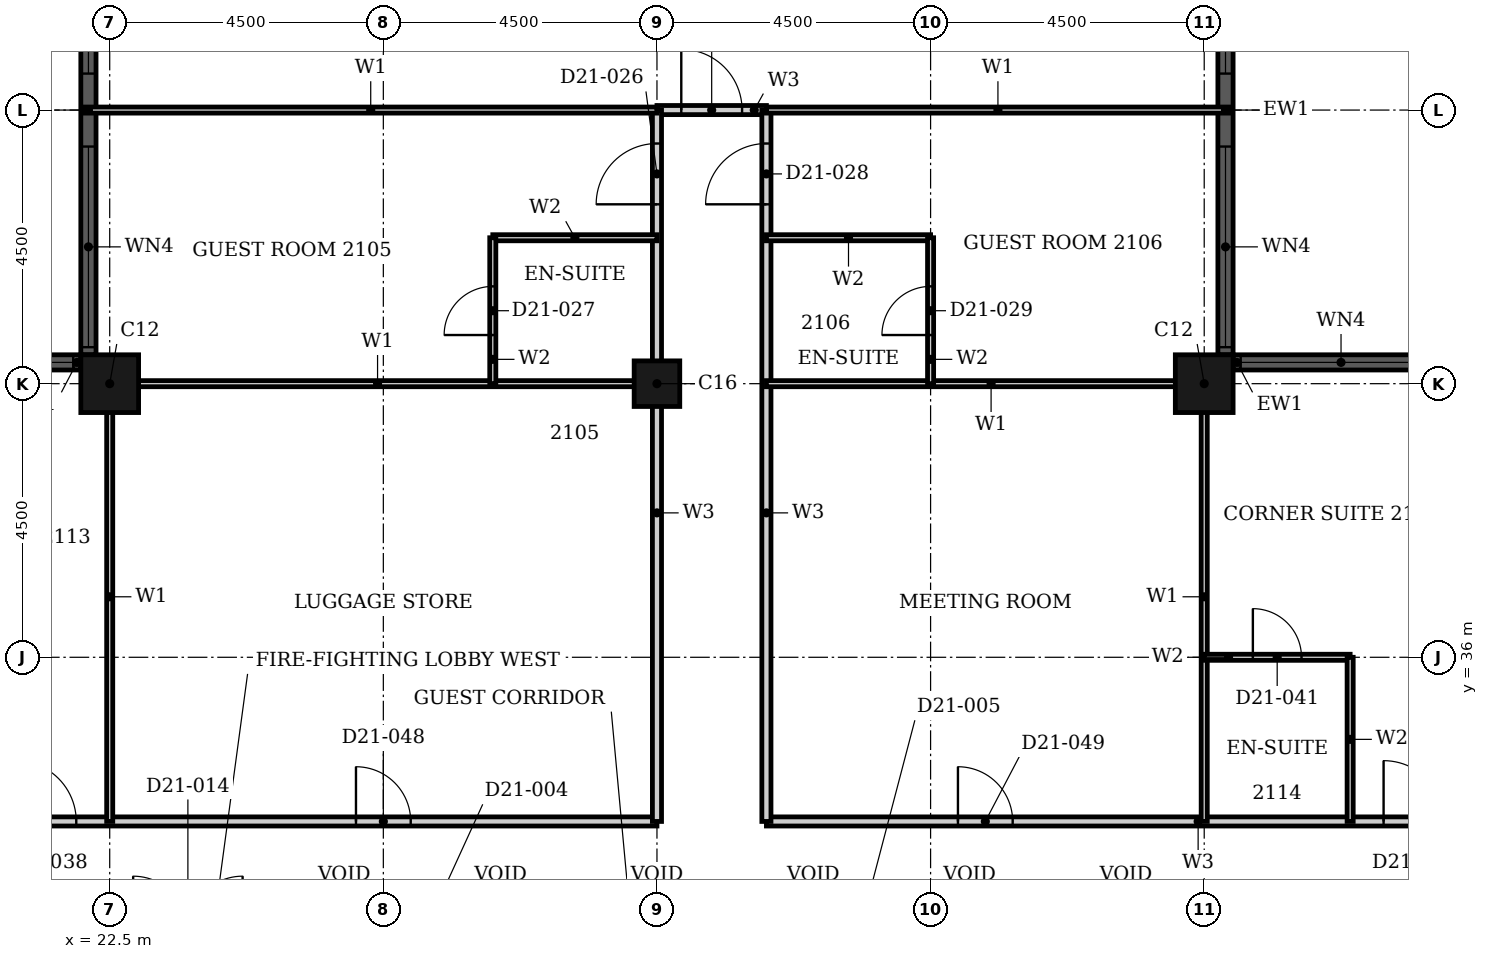
"""IFC4 building model, lengths in metres.
Left out: names, types, materials, properties, quantities, classifications, styles, units other than length and angle.
Written with IfcOpenShell. Run it as: python <this file> out.ifc"""

import sys

from ifc_helpers import new_model, si_unit, direction, frame, frame_2d, origin, origin_2d, place, context, subcontext, project, spatial, rectangle, hollow_rectangle, extrude, element, fill, save


model = new_model("IFC4")
c1 = context("Model", 3, precision=1e-05, world=origin(), true_north=direction((0.0, 1.0)))
c2 = subcontext(c1, "Body", "Model", "MODEL_VIEW")
j1 = project(units=[si_unit("LENGTHUNIT", "METRE"), si_unit("PLANEANGLEUNIT", "RADIAN")], contexts=[c1])
p1 = place(None, origin())
s1 = spatial("IfcSite", under=j1, at=p1, CompositionType="ELEMENT")
p2 = place(p1, origin())
s2 = spatial("IfcBuilding", under=s1, at=p2, CompositionType="ELEMENT")
p3 = place(p2, frame((0.0, 0.0, 88.8)))
s3 = spatial("IfcBuildingStorey", under=s2, at=p3, CompositionType="ELEMENT", Elevation=88.8)
for number, where, z_axis, x_axis in (
    (1, (40.5, 40.5, 0.0), (0.0, 0.0, 1.0), (1.0, 0.0, 0.0)),
    (2, (22.5, 40.5, 0.0), (0.0, 0.0, 1.0), (1.0, 0.0, 0.0)),
):
    element("IfcColumn", number, at=place(p3, frame(where, z_axis=z_axis, x_axis=x_axis)), inside=s3, PredefinedType="COLUMN", context=c2, shape_type="SweptSolid", body=[
        extrude(hollow_rectangle(XDim=0.95, YDim=0.95, WallThickness=0.03, at=origin_2d()), origin(), (0.0, 0.0, 1.0), 3.6),
    ])
p4 = place(p3, frame((31.5, 40.5, 0.0), z_axis=(0.0, 0.0, 1.0), x_axis=(1.0, 0.0, 0.0)))
e3 = element("IfcColumn", 3, at=p4, inside=s3, PredefinedType="COLUMN", context=c2, shape_type="SweptSolid", body=[
    extrude(hollow_rectangle(XDim=0.75, YDim=0.75, WallThickness=0.024, at=origin_2d()), origin(), (0.0, 0.0, 1.0), 3.6),
])
p5 = place(p3, frame((44.525, 40.85, 0.0), z_axis=(0.0, 0.0, 1.0), x_axis=(-1.0, 0.0, 0.0)))
e4 = element("IfcWall", 4, at=p5, inside=s3, PredefinedType="SOLIDWALL", context=c2, shape_type="SweptSolid", body=[
    extrude(rectangle(XDim=3.55, YDim=0.25, at=frame_2d((1.775, 0.0))), origin(), (0.0, 0.0, 1.0), 3.6),
])
p6 = place(p5, frame((0.125, 0.0, 0.9)))
e5 = element("IfcOpeningElement", 5, at=p6, cuts=e4, PredefinedType="OPENING", context=c2, shape_type="SweptSolid", body=[
    extrude(rectangle(XDim=3.3, YDim=2.08, at=frame_2d((1.65, 1.04))), frame((0.0, 0.135, 0.0), z_axis=(0.0, -1.0, 0.0), x_axis=(1.0, 0.0, 0.0)), (0.0, 0.0, 1.0), 0.27),
])
p7 = place(p3, frame((40.85, 40.975, 0.0), z_axis=(0.0, 0.0, 1.0), x_axis=(0.0, 1.0, 0.0)))
e6 = element("IfcWall", 6, at=p7, inside=s3, PredefinedType="SOLIDWALL", context=c2, shape_type="SweptSolid", body=[
    extrude(rectangle(XDim=8.05, YDim=0.25, at=frame_2d((4.025, 0.0))), origin(), (0.0, 0.0, 1.0), 3.6),
])
p8 = place(p7, frame((0.125, 0.0, 0.9)))
e7 = element("IfcOpeningElement", 7, at=p8, cuts=e6, PredefinedType="OPENING", context=c2, shape_type="SweptSolid", body=[
    extrude(rectangle(XDim=3.3, YDim=2.08, at=frame_2d((1.65, 1.04))), frame((0.0, 0.135, 0.0), z_axis=(0.0, -1.0, 0.0), x_axis=(1.0, 0.0, 0.0)), (0.0, 0.0, 1.0), 0.27),
])
p9 = place(p7, frame((4.625, 0.0, 0.9)))
e8 = element("IfcOpeningElement", 8, at=p9, cuts=e6, PredefinedType="OPENING", context=c2, shape_type="SweptSolid", body=[
    extrude(rectangle(XDim=3.3, YDim=2.08, at=frame_2d((1.65, 1.04))), frame((0.0, 0.135, 0.0), z_axis=(0.0, -1.0, 0.0), x_axis=(1.0, 0.0, 0.0)), (0.0, 0.0, 1.0), 0.27),
])
p10 = place(p3, frame((22.15, 49.025, 0.0), z_axis=(0.0, 0.0, 1.0), x_axis=(0.0, -1.0, 0.0)))
e9 = element("IfcWall", 9, at=p10, inside=s3, PredefinedType="SOLIDWALL", context=c2, shape_type="SweptSolid", body=[
    extrude(rectangle(XDim=8.05, YDim=0.25, at=frame_2d((4.025, 0.0))), origin(), (0.0, 0.0, 1.0), 3.6),
])
p11 = place(p10, frame((0.125, 0.0, 0.9)))
e10 = element("IfcOpeningElement", 10, at=p11, cuts=e9, PredefinedType="OPENING", context=c2, shape_type="SweptSolid", body=[
    extrude(rectangle(XDim=3.3, YDim=2.08, at=frame_2d((1.65, 1.04))), frame((0.0, 0.135, 0.0), z_axis=(0.0, -1.0, 0.0), x_axis=(1.0, 0.0, 0.0)), (0.0, 0.0, 1.0), 0.27),
])
p12 = place(p10, frame((4.625, 0.0, 0.9)))
e11 = element("IfcOpeningElement", 11, at=p12, cuts=e9, PredefinedType="OPENING", context=c2, shape_type="SweptSolid", body=[
    extrude(rectangle(XDim=3.3, YDim=2.08, at=frame_2d((1.65, 1.04))), frame((0.0, 0.135, 0.0), z_axis=(0.0, -1.0, 0.0), x_axis=(1.0, 0.0, 0.0)), (0.0, 0.0, 1.0), 0.27),
])
p13 = place(p3, frame((22.025, 40.85, 0.0), z_axis=(0.0, 0.0, 1.0), x_axis=(-1.0, 0.0, 0.0)))
e12 = element("IfcWall", 12, at=p13, inside=s3, PredefinedType="SOLIDWALL", context=c2, shape_type="SweptSolid", body=[
    extrude(rectangle(XDim=3.55, YDim=0.25, at=frame_2d((1.775, 0.0))), origin(), (0.0, 0.0, 1.0), 3.6),
])
p14 = place(p13, frame((0.125, 0.0, 0.9)))
e13 = element("IfcOpeningElement", 13, at=p14, cuts=e12, PredefinedType="OPENING", context=c2, shape_type="SweptSolid", body=[
    extrude(rectangle(XDim=3.3, YDim=2.08, at=frame_2d((1.65, 1.04))), frame((0.0, 0.135, 0.0), z_axis=(0.0, -1.0, 0.0), x_axis=(1.0, 0.0, 0.0)), (0.0, 0.0, 1.0), 0.27),
])
p15 = place(p3, frame((16.2, 33.3, 0.0), z_axis=(0.0, 0.0, 1.0), x_axis=(1.0, 0.0, 0.0)))
e14 = element("IfcWall", 14, at=p15, inside=s3, PredefinedType="PARTITIONING", context=c2, shape_type="SweptSolid", body=[
    extrude(rectangle(XDim=15.3, YDim=0.15, at=frame_2d((7.65, 0.0))), origin(), (0.0, 0.0, 1.0), 3.3),
])
p16 = place(p15, frame((4.75, 0.0, 0.0)))
e15 = element("IfcOpeningElement", 15, at=p16, cuts=e14, PredefinedType="OPENING", context=c2, shape_type="SweptSolid", body=[
    extrude(rectangle(XDim=1.0, YDim=2.1, at=frame_2d((0.5, 1.05))), frame((0.0, 0.085, 0.0), z_axis=(0.0, -1.0, 0.0), x_axis=(1.0, 0.0, 0.0)), (0.0, 0.0, 1.0), 0.17),
])
p17 = place(p15, frame((10.35, 0.0, 0.0)))
e16 = element("IfcOpeningElement", 16, at=p17, cuts=e14, PredefinedType="OPENING", context=c2, shape_type="SweptSolid", body=[
    extrude(rectangle(XDim=0.9, YDim=2.1, at=frame_2d((0.45, 1.05))), frame((0.0, 0.085, 0.0), z_axis=(0.0, -1.0, 0.0), x_axis=(1.0, 0.0, 0.0)), (0.0, 0.0, 1.0), 0.17),
])
p18 = place(p3, frame((33.3, 33.3, 0.0), z_axis=(0.0, 0.0, 1.0), x_axis=(1.0, 0.0, 0.0)))
e17 = element("IfcWall", 17, at=p18, inside=s3, PredefinedType="PARTITIONING", context=c2, shape_type="SweptSolid", body=[
    extrude(rectangle(XDim=13.5, YDim=0.15, at=frame_2d((6.75, 0.0))), origin(), (0.0, 0.0, 1.0), 3.3),
])
p19 = place(p18, frame((10.15, 0.0, 0.0)))
e18 = element("IfcOpeningElement", 18, at=p19, cuts=e17, PredefinedType="OPENING", context=c2, shape_type="SweptSolid", body=[
    extrude(rectangle(XDim=1.0, YDim=2.1, at=frame_2d((0.5, 1.05))), frame((0.0, 0.085, 0.0), z_axis=(0.0, -1.0, 0.0), x_axis=(1.0, 0.0, 0.0)), (0.0, 0.0, 1.0), 0.17),
])
p20 = place(p18, frame((3.15, 0.0, 0.0)))
e19 = element("IfcOpeningElement", 19, at=p20, cuts=e17, PredefinedType="OPENING", context=c2, shape_type="SweptSolid", body=[
    extrude(rectangle(XDim=0.9, YDim=2.1, at=frame_2d((0.45, 1.05))), frame((0.0, 0.085, 0.0), z_axis=(0.0, -1.0, 0.0), x_axis=(1.0, 0.0, 0.0)), (0.0, 0.0, 1.0), 0.17),
])
p21 = place(p3, frame((31.5, 45.0, 0.0), z_axis=(0.0, 0.0, 1.0), x_axis=(1.0, 0.0, 0.0)))
e20 = element("IfcWall", 20, at=p21, inside=s3, PredefinedType="PARTITIONING", context=c2, shape_type="SweptSolid", body=[
    extrude(rectangle(XDim=1.8, YDim=0.15, at=frame_2d((0.9, 0.0))), origin(), (0.0, 0.0, 1.0), 3.3),
])
p22 = place(p21, frame((0.4, 0.0, 0.0)))
e21 = element("IfcOpeningElement", 21, at=p22, cuts=e20, PredefinedType="OPENING", context=c2, shape_type="SweptSolid", body=[
    extrude(rectangle(XDim=1.0, YDim=2.1, at=frame_2d((0.5, 1.05))), frame((0.0, 0.085, 0.0), z_axis=(0.0, -1.0, 0.0), x_axis=(1.0, 0.0, 0.0)), (0.0, 0.0, 1.0), 0.17),
])
p23 = place(p3, frame((31.5, 33.3, 0.0), z_axis=(0.0, 0.0, 1.0), x_axis=(0.0, 1.0, 0.0)))
e22 = element("IfcWall", 22, at=p23, inside=s3, PredefinedType="PARTITIONING", context=c2, shape_type="SweptSolid", body=[
    extrude(rectangle(XDim=11.7, YDim=0.15, at=frame_2d((5.85, 0.0))), origin(), (0.0, 0.0, 1.0), 2.58),
])
p24 = place(p23, frame((10.15, 0.0, 0.0)))
e23 = element("IfcOpeningElement", 23, at=p24, cuts=e22, PredefinedType="OPENING", context=c2, shape_type="SweptSolid", body=[
    extrude(rectangle(XDim=1.0, YDim=2.1, at=frame_2d((0.5, 1.05))), frame((0.0, 0.085, 0.0), z_axis=(0.0, -1.0, 0.0), x_axis=(1.0, 0.0, 0.0)), (0.0, 0.0, 1.0), 0.17),
])
p25 = place(p3, frame((33.3, 33.3, 0.0), z_axis=(0.0, 0.0, 1.0), x_axis=(0.0, 1.0, 0.0)))
e24 = element("IfcWall", 24, at=p25, inside=s3, PredefinedType="PARTITIONING", context=c2, shape_type="SweptSolid", body=[
    extrude(rectangle(XDim=11.7, YDim=0.15, at=frame_2d((5.85, 0.0))), origin(), (0.0, 0.0, 1.0), 3.3),
])
p26 = place(p25, frame((10.15, 0.0, 0.0)))
e25 = element("IfcOpeningElement", 25, at=p26, cuts=e24, PredefinedType="OPENING", context=c2, shape_type="SweptSolid", body=[
    extrude(rectangle(XDim=1.0, YDim=2.1, at=frame_2d((0.5, 1.05))), frame((0.0, 0.085, 0.0), z_axis=(0.0, -1.0, 0.0), x_axis=(1.0, 0.0, 0.0)), (0.0, 0.0, 1.0), 0.17),
])
p27 = place(p3, frame((33.3, 40.5, 0.0), z_axis=(0.0, 0.0, 1.0), x_axis=(1.0, 0.0, 0.0)))
e26 = element("IfcWall", 26, at=p27, inside=s3, PredefinedType="PARTITIONING", context=c2, shape_type="SweptSolid", body=[
    extrude(rectangle(XDim=7.39, YDim=0.1, at=frame_2d((3.695, 0.0))), origin(), (0.0, 0.0, 1.0), 2.38),
])
p28 = place(p3, frame((22.31, 40.5, 0.0), z_axis=(0.0, 0.0, 1.0), x_axis=(1.0, 0.0, 0.0)))
e27 = element("IfcWall", 27, at=p28, inside=s3, PredefinedType="PARTITIONING", context=c2, shape_type="SweptSolid", body=[
    extrude(rectangle(XDim=9.19, YDim=0.1, at=frame_2d((4.595, 0.0))), origin(), (0.0, 0.0, 1.0), 2.38),
])
p29 = place(p3, frame((33.3, 45.0, 0.0), z_axis=(0.0, 0.0, 1.0), x_axis=(1.0, 0.0, 0.0)))
e28 = element("IfcWall", 28, at=p29, inside=s3, PredefinedType="PARTITIONING", context=c2, shape_type="SweptSolid", body=[
    extrude(rectangle(XDim=7.615, YDim=0.1, at=frame_2d((3.808, 0.0))), origin(), (0.0, 0.0, 1.0), 3.3),
])
p30 = place(p3, frame((22.085, 45.0, 0.0), z_axis=(0.0, 0.0, 1.0), x_axis=(1.0, 0.0, 0.0)))
e29 = element("IfcWall", 29, at=p30, inside=s3, PredefinedType="PARTITIONING", context=c2, shape_type="SweptSolid", body=[
    extrude(rectangle(XDim=9.415, YDim=0.1, at=frame_2d((4.708, 0.0))), origin(), (0.0, 0.0, 1.0), 3.3),
])
for number, where, z_axis, x_axis in (
    (30, (22.5, 33.3, 0.0), (0.0, 0.0, 1.0), (0.0, 1.0, 0.0)),
    (31, (40.5, 33.3, 0.0), (0.0, 0.0, 1.0), (0.0, 1.0, 0.0)),
):
    element("IfcWall", number, at=place(p3, frame(where, z_axis=z_axis, x_axis=x_axis)), inside=s3, PredefinedType="PARTITIONING", context=c2, shape_type="SweptSolid", body=[
        extrude(rectangle(XDim=7.39, YDim=0.1, at=frame_2d((3.695, 0.0))), origin(), (0.0, 0.0, 1.0), 3.3),
    ])
p31 = place(p3, frame((40.5, 36.0, 0.0), z_axis=(0.0, 0.0, 1.0), x_axis=(1.0, 0.0, 0.0)))
e32 = element("IfcWall", 32, at=p31, inside=s3, PredefinedType="PARTITIONING", context=c2, shape_type="SweptSolid", body=[
    extrude(rectangle(XDim=2.4, YDim=0.1, at=frame_2d((1.2, 0.0))), origin(), (0.0, 0.0, 1.0), 3.3),
])
p32 = place(p31, frame((0.8, 0.0, 0.0)))
e33 = element("IfcOpeningElement", 33, at=p32, cuts=e32, PredefinedType="OPENING", context=c2, shape_type="SweptSolid", body=[
    extrude(rectangle(XDim=0.8, YDim=2.1, at=frame_2d((0.4, 1.05))), frame((0.0, 0.06, 0.0), z_axis=(0.0, -1.0, 0.0), x_axis=(1.0, 0.0, 0.0)), (0.0, 0.0, 1.0), 0.12),
])
for number, where, z_axis, x_axis in (
    (34, (33.3, 42.9, 0.0), (0.0, 0.0, 1.0), (1.0, 0.0, 0.0)),
    (35, (28.8, 42.9, 0.0), (0.0, 0.0, 1.0), (1.0, 0.0, 0.0)),
):
    element("IfcWall", number, at=place(p3, frame(where, z_axis=z_axis, x_axis=x_axis)), inside=s3, PredefinedType="PARTITIONING", context=c2, shape_type="SweptSolid", body=[
        extrude(rectangle(XDim=2.7, YDim=0.1, at=frame_2d((1.35, 0.0))), origin(), (0.0, 0.0, 1.0), 3.3),
    ])
p33 = place(p3, frame((28.8, 40.5, 0.0), z_axis=(0.0, 0.0, 1.0), x_axis=(0.0, 1.0, 0.0)))
e36 = element("IfcWall", 36, at=p33, inside=s3, PredefinedType="PARTITIONING", context=c2, shape_type="SweptSolid", body=[
    extrude(rectangle(XDim=2.4, YDim=0.1, at=frame_2d((1.2, 0.0))), origin(), (0.0, 0.0, 1.0), 3.3),
])
p34 = place(p33, frame((0.8, 0.0, 0.0)))
e37 = element("IfcOpeningElement", 37, at=p34, cuts=e36, PredefinedType="OPENING", context=c2, shape_type="SweptSolid", body=[
    extrude(rectangle(XDim=0.8, YDim=2.1, at=frame_2d((0.4, 1.05))), frame((0.0, 0.06, 0.0), z_axis=(0.0, -1.0, 0.0), x_axis=(1.0, 0.0, 0.0)), (0.0, 0.0, 1.0), 0.12),
])
p35 = place(p3, frame((36.0, 40.5, 0.0), z_axis=(0.0, 0.0, 1.0), x_axis=(0.0, 1.0, 0.0)))
e38 = element("IfcWall", 38, at=p35, inside=s3, PredefinedType="PARTITIONING", context=c2, shape_type="SweptSolid", body=[
    extrude(rectangle(XDim=2.4, YDim=0.1, at=frame_2d((1.2, 0.0))), origin(), (0.0, 0.0, 1.0), 2.58),
])
p36 = place(p35, frame((0.8, 0.0, 0.0)))
e39 = element("IfcOpeningElement", 39, at=p36, cuts=e38, PredefinedType="OPENING", context=c2, shape_type="SweptSolid", body=[
    extrude(rectangle(XDim=0.8, YDim=2.1, at=frame_2d((0.4, 1.05))), frame((0.0, 0.06, 0.0), z_axis=(0.0, -1.0, 0.0), x_axis=(1.0, 0.0, 0.0)), (0.0, 0.0, 1.0), 0.12),
])
p37 = place(p3, frame((42.9, 33.3, 0.0), z_axis=(0.0, 0.0, 1.0), x_axis=(0.0, 1.0, 0.0)))
e40 = element("IfcWall", 40, at=p37, inside=s3, PredefinedType="PARTITIONING", context=c2, shape_type="SweptSolid", body=[
    extrude(rectangle(XDim=2.7, YDim=0.1, at=frame_2d((1.35, 0.0))), origin(), (0.0, 0.0, 1.0), 3.3),
])
p38 = place(p6, origin())
e41 = element("IfcWindow", 41, at=p38, inside=s3, PartitioningType="SINGLE_PANEL", PredefinedType="WINDOW", context=c2, shape_type="SweptSolid", body=[
    extrude(rectangle(XDim=3.3, YDim=2.08, at=frame_2d((1.65, 1.04))), frame((0.0, 0.03, 0.0), z_axis=(0.0, -1.0, 0.0), x_axis=(1.0, 0.0, 0.0)), (0.0, 0.0, 1.0), 0.06),
])
fill(e5, e41)
p39 = place(p8, origin())
e42 = element("IfcWindow", 42, at=p39, inside=s3, PartitioningType="SINGLE_PANEL", PredefinedType="WINDOW", context=c2, shape_type="SweptSolid", body=[
    extrude(rectangle(XDim=3.3, YDim=2.08, at=frame_2d((1.65, 1.04))), frame((0.0, 0.03, 0.0), z_axis=(0.0, -1.0, 0.0), x_axis=(1.0, 0.0, 0.0)), (0.0, 0.0, 1.0), 0.06),
])
fill(e7, e42)
p40 = place(p9, origin())
e43 = element("IfcWindow", 43, at=p40, inside=s3, PartitioningType="SINGLE_PANEL", PredefinedType="WINDOW", context=c2, shape_type="SweptSolid", body=[
    extrude(rectangle(XDim=3.3, YDim=2.08, at=frame_2d((1.65, 1.04))), frame((0.0, 0.03, 0.0), z_axis=(0.0, -1.0, 0.0), x_axis=(1.0, 0.0, 0.0)), (0.0, 0.0, 1.0), 0.06),
])
fill(e8, e43)
p41 = place(p11, origin())
e44 = element("IfcWindow", 44, at=p41, inside=s3, PartitioningType="SINGLE_PANEL", PredefinedType="WINDOW", context=c2, shape_type="SweptSolid", body=[
    extrude(rectangle(XDim=3.3, YDim=2.08, at=frame_2d((1.65, 1.04))), frame((0.0, 0.03, 0.0), z_axis=(0.0, -1.0, 0.0), x_axis=(1.0, 0.0, 0.0)), (0.0, 0.0, 1.0), 0.06),
])
fill(e10, e44)
p42 = place(p12, origin())
e45 = element("IfcWindow", 45, at=p42, inside=s3, PartitioningType="SINGLE_PANEL", PredefinedType="WINDOW", context=c2, shape_type="SweptSolid", body=[
    extrude(rectangle(XDim=3.3, YDim=2.08, at=frame_2d((1.65, 1.04))), frame((0.0, 0.03, 0.0), z_axis=(0.0, -1.0, 0.0), x_axis=(1.0, 0.0, 0.0)), (0.0, 0.0, 1.0), 0.06),
])
fill(e11, e45)
p43 = place(p14, origin())
e46 = element("IfcWindow", 46, at=p43, inside=s3, PartitioningType="SINGLE_PANEL", PredefinedType="WINDOW", context=c2, shape_type="SweptSolid", body=[
    extrude(rectangle(XDim=3.3, YDim=2.08, at=frame_2d((1.65, 1.04))), frame((0.0, 0.03, 0.0), z_axis=(0.0, -1.0, 0.0), x_axis=(1.0, 0.0, 0.0)), (0.0, 0.0, 1.0), 0.06),
])
fill(e13, e46)
p44 = place(p24, origin())
e47 = element("IfcDoor", 47, at=p44, inside=s3, OperationType="SINGLE_SWING_RIGHT", PredefinedType="DOOR", context=c2, shape_type="SweptSolid", body=[
    extrude(rectangle(XDim=1.0, YDim=2.1, at=frame_2d((0.5, 1.05))), frame((0.0, 0.025, 0.0), z_axis=(0.0, -1.0, 0.0), x_axis=(1.0, 0.0, 0.0)), (0.0, 0.0, 1.0), 0.05),
])
fill(e23, e47)
p45 = place(p34, origin())
e48 = element("IfcDoor", 48, at=p45, inside=s3, OperationType="SINGLE_SWING_RIGHT", PredefinedType="DOOR", context=c2, shape_type="SweptSolid", body=[
    extrude(rectangle(XDim=0.8, YDim=2.1, at=frame_2d((0.4, 1.05))), frame((0.0, 0.025, 0.0), z_axis=(0.0, -1.0, 0.0), x_axis=(1.0, 0.0, 0.0)), (0.0, 0.0, 1.0), 0.05),
])
fill(e37, e48)
p46 = place(p26, origin())
e49 = element("IfcDoor", 49, at=p46, inside=s3, OperationType="SINGLE_SWING_RIGHT", PredefinedType="DOOR", context=c2, shape_type="SweptSolid", body=[
    extrude(rectangle(XDim=1.0, YDim=2.1, at=frame_2d((0.5, 1.05))), frame((0.0, 0.025, 0.0), z_axis=(0.0, -1.0, 0.0), x_axis=(1.0, 0.0, 0.0)), (0.0, 0.0, 1.0), 0.05),
])
fill(e25, e49)
p47 = place(p36, origin())
e50 = element("IfcDoor", 50, at=p47, inside=s3, OperationType="SINGLE_SWING_RIGHT", PredefinedType="DOOR", context=c2, shape_type="SweptSolid", body=[
    extrude(rectangle(XDim=0.8, YDim=2.1, at=frame_2d((0.4, 1.05))), frame((0.0, 0.025, 0.0), z_axis=(0.0, -1.0, 0.0), x_axis=(1.0, 0.0, 0.0)), (0.0, 0.0, 1.0), 0.05),
])
fill(e39, e50)
p48 = place(p22, origin())
e51 = element("IfcDoor", 51, at=p48, inside=s3, OperationType="SINGLE_SWING_LEFT", PredefinedType="DOOR", context=c2, shape_type="SweptSolid", body=[
    extrude(rectangle(XDim=1.0, YDim=2.1, at=frame_2d((0.5, 1.05))), frame((0.0, 0.025, 0.0), z_axis=(0.0, -1.0, 0.0), x_axis=(1.0, 0.0, 0.0)), (0.0, 0.0, 1.0), 0.05),
])
fill(e21, e51)
p49 = place(p16, origin())
e52 = element("IfcDoor", 52, at=p49, inside=s3, OperationType="SINGLE_SWING_RIGHT", PredefinedType="DOOR", context=c2, shape_type="SweptSolid", body=[
    extrude(rectangle(XDim=1.0, YDim=2.1, at=frame_2d((0.5, 1.05))), frame((0.0, 0.025, 0.0), z_axis=(0.0, -1.0, 0.0), x_axis=(1.0, 0.0, 0.0)), (0.0, 0.0, 1.0), 0.05),
])
fill(e15, e52)
p50 = place(p19, origin())
e53 = element("IfcDoor", 53, at=p50, inside=s3, OperationType="SINGLE_SWING_RIGHT", PredefinedType="DOOR", context=c2, shape_type="SweptSolid", body=[
    extrude(rectangle(XDim=1.0, YDim=2.1, at=frame_2d((0.5, 1.05))), frame((0.0, 0.025, 0.0), z_axis=(0.0, -1.0, 0.0), x_axis=(1.0, 0.0, 0.0)), (0.0, 0.0, 1.0), 0.05),
])
fill(e18, e53)
p51 = place(p32, origin())
e54 = element("IfcDoor", 54, at=p51, inside=s3, OperationType="SINGLE_SWING_RIGHT", PredefinedType="DOOR", context=c2, shape_type="SweptSolid", body=[
    extrude(rectangle(XDim=0.8, YDim=2.1, at=frame_2d((0.4, 1.05))), frame((0.0, 0.025, 0.0), z_axis=(0.0, -1.0, 0.0), x_axis=(1.0, 0.0, 0.0)), (0.0, 0.0, 1.0), 0.05),
])
fill(e33, e54)
p52 = place(p17, origin())
e55 = element("IfcDoor", 55, at=p52, inside=s3, OperationType="SINGLE_SWING_RIGHT", PredefinedType="DOOR", context=c2, shape_type="SweptSolid", body=[
    extrude(rectangle(XDim=0.9, YDim=2.1, at=frame_2d((0.45, 1.05))), frame((0.0, 0.025, 0.0), z_axis=(0.0, -1.0, 0.0), x_axis=(1.0, 0.0, 0.0)), (0.0, 0.0, 1.0), 0.05),
])
fill(e16, e55)
p53 = place(p20, origin())
e56 = element("IfcDoor", 56, at=p53, inside=s3, OperationType="SINGLE_SWING_LEFT", PredefinedType="DOOR", context=c2, shape_type="SweptSolid", body=[
    extrude(rectangle(XDim=0.9, YDim=2.1, at=frame_2d((0.45, 1.05))), frame((0.0, 0.025, 0.0), z_axis=(0.0, -1.0, 0.0), x_axis=(1.0, 0.0, 0.0)), (0.0, 0.0, 1.0), 0.05),
])
fill(e19, e56)
save(model, sys.argv[1])
